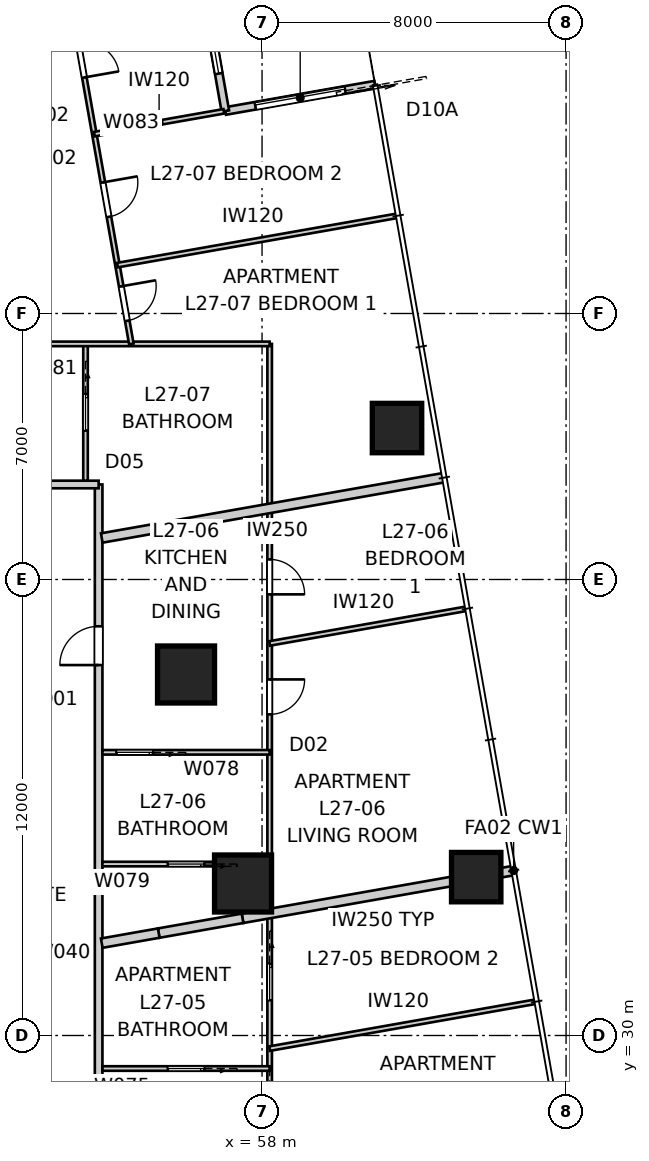
"""IFC4 building model, lengths in metres.
Left out: names, types, materials, properties, quantities, classifications, styles, units other than length and angle.
Written with IfcOpenShell. Run it as: python <this file> out.ifc"""

import sys

from ifc_helpers import new_model, si_unit, direction, frame, frame_2d, origin, origin_2d, place, context, subcontext, project, spatial, rectangle, extrude, element, fill, save


model = new_model("IFC4")
c1 = context("Model", 3, precision=1e-05, world=origin(), true_north=direction((0.0, 1.0)))
c2 = subcontext(c1, "Body", "Model", "MODEL_VIEW")
j1 = project(units=[si_unit("LENGTHUNIT", "METRE"), si_unit("PLANEANGLEUNIT", "RADIAN")], contexts=[c1])
p1 = place(None, origin())
s1 = spatial("IfcSite", under=j1, at=p1, CompositionType="ELEMENT")
p2 = place(p1, origin())
s2 = spatial("IfcBuilding", under=s1, at=p2, CompositionType="ELEMENT")
p3 = place(p2, frame((0.0, 0.0, 99.8)))
s3 = spatial("IfcBuildingStorey", under=s2, at=p3, CompositionType="ELEMENT", Elevation=99.8)
for number, where, z_axis, x_axis in (
    (1, (63.635, 34.167, 0.0), (0.0, 0.0, 1.0), (1.0, 0.0, 0.0)),
    (2, (61.552, 45.985, 0.0), (0.0, 0.0, 1.0), (1.0, 0.0, 0.0)),
):
    element("IfcColumn", number, at=place(p3, frame(where, z_axis=z_axis, x_axis=x_axis)), inside=s3, PredefinedType="COLUMN", context=c2, shape_type="SweptSolid", body=[
        extrude(rectangle(XDim=1.3, YDim=1.3, at=origin_2d()), origin(), (0.0, 0.0, 1.0), 3.4),
    ])
for number, where, z_axis, x_axis in (
    (3, (57.5, 34.0, 0.0), (0.0, 0.0, 1.0), (1.0, 0.0, 0.0)),
    (4, (56.0, 39.5, 0.0), (0.0, 0.0, 1.0), (1.0, 0.0, 0.0)),
):
    element("IfcColumn", number, at=place(p3, frame(where, z_axis=z_axis, x_axis=x_axis)), inside=s3, PredefinedType="COLUMN", context=c2, shape_type="SweptSolid", body=[
        extrude(rectangle(XDim=1.5, YDim=1.5, at=origin_2d()), origin(), (0.0, 0.0, 1.0), 3.4),
    ])
p4 = place(p3, frame((60.974, 55.022, 0.0), z_axis=(0.0, 0.0, 1.0), x_axis=(-0.984808127031, -0.173646056486, 0.0)))
e5 = element("IfcWall", 5, at=p4, inside=s3, PredefinedType="SOLIDWALL", context=c2, shape_type="SweptSolid", body=[
    extrude(rectangle(XDim=4.0, YDim=0.2, at=frame_2d((2.0, 0.0))), origin(), (0.0, 0.0, 1.0), 3.25),
])
p5 = place(p4, frame((0.8, 0.0, 0.0)))
e6 = element("IfcOpeningElement", 6, at=p5, cuts=e5, PredefinedType="OPENING", context=c2, shape_type="SweptSolid", body=[
    extrude(rectangle(XDim=2.4, YDim=2.1, at=frame_2d((1.2, 1.05))), frame((0.0, 0.11, 0.0), z_axis=(0.0, -1.0, 0.0), x_axis=(1.0, 0.0, 0.0)), (0.0, 0.0, 1.0), 0.22),
])
p6 = place(p3, frame((57.034, 54.328, 0.0), z_axis=(0.0, 0.0, 1.0), x_axis=(-0.173646056486, 0.984808127031, 0.0)))
e7 = element("IfcWall", 7, at=p6, inside=s3, PredefinedType="SOLIDWALL", context=c2, shape_type="SweptSolid", body=[
    extrude(rectangle(XDim=4.0, YDim=0.2, at=frame_2d((2.0, 0.0))), origin(), (0.0, 0.0, 1.0), 3.25),
])
p7 = place(p6, frame((1.0, 0.0, 0.45)))
e8 = element("IfcOpeningElement", 8, at=p7, cuts=e7, PredefinedType="OPENING", context=c2, shape_type="SweptSolid", body=[
    extrude(rectangle(XDim=2.0, YDim=1.8, at=frame_2d((1.0, 0.9))), frame((0.0, 0.11, 0.0), z_axis=(0.0, -1.0, 0.0), x_axis=(1.0, 0.0, 0.0)), (0.0, 0.0, 1.0), 0.22),
])
p8 = place(p3, frame((53.7, 15.5, 0.0), z_axis=(0.0, 0.0, 1.0), x_axis=(0.0, 1.0, 0.0)))
e9 = element("IfcWall", 9, at=p8, inside=s3, PredefinedType="PARTITIONING", context=c2, shape_type="SweptSolid", body=[
    extrude(rectangle(XDim=29.0, YDim=0.2, at=frame_2d((14.5, 0.0))), origin(), (0.0, 0.0, 1.0), 3.25),
])
p9 = place(p8, frame((24.248, 0.0, 0.0)))
e10 = element("IfcOpeningElement", 10, at=p9, cuts=e9, PredefinedType="OPENING", context=c2, shape_type="SweptSolid", body=[
    extrude(rectangle(XDim=1.02, YDim=2.34, at=frame_2d((0.51, 1.17))), frame((0.0, 0.11, 0.0), z_axis=(0.0, -1.0, 0.0), x_axis=(1.0, 0.0, 0.0)), (0.0, 0.0, 1.0), 0.22),
])
p10 = place(p8, frame((2.976, 0.0, 0.0)))
e11 = element("IfcOpeningElement", 11, at=p10, cuts=e9, PredefinedType="OPENING", context=c2, shape_type="SweptSolid", body=[
    extrude(rectangle(XDim=1.02, YDim=2.1, at=frame_2d((0.51, 1.05))), frame((0.0, 0.11, 0.0), z_axis=(0.0, -1.0, 0.0), x_axis=(1.0, 0.0, 0.0)), (0.0, 0.0, 1.0), 0.22),
])
p11 = place(p8, frame((8.092, 0.0, 0.0)))
e12 = element("IfcOpeningElement", 12, at=p11, cuts=e9, PredefinedType="OPENING", context=c2, shape_type="SweptSolid", body=[
    extrude(rectangle(XDim=1.02, YDim=2.34, at=frame_2d((0.51, 1.17))), frame((0.0, 0.11, 0.0), z_axis=(0.0, -1.0, 0.0), x_axis=(1.0, 0.0, 0.0)), (0.0, 0.0, 1.0), 0.22),
])
p12 = place(p3, frame((53.7, 44.5, 0.0), z_axis=(0.0, 0.0, 1.0), x_axis=(-1.0, 0.0, 0.0)))
e13 = element("IfcWall", 13, at=p12, inside=s3, PredefinedType="PARTITIONING", context=c2, shape_type="SweptSolid", body=[
    extrude(rectangle(XDim=27.4, YDim=0.2, at=frame_2d((13.7, 0.0))), origin(), (0.0, 0.0, 1.0), 3.25),
])
p13 = place(p12, frame((24.056, 0.0, 0.0)))
e14 = element("IfcOpeningElement", 14, at=p13, cuts=e13, PredefinedType="OPENING", context=c2, shape_type="SweptSolid", body=[
    extrude(rectangle(XDim=1.02, YDim=2.1, at=frame_2d((0.51, 1.05))), frame((0.0, 0.11, 0.0), z_axis=(0.0, -1.0, 0.0), x_axis=(1.0, 0.0, 0.0)), (0.0, 0.0, 1.0), 0.22),
])
p14 = place(p12, frame((2.305, 0.0, 0.0)))
e15 = element("IfcOpeningElement", 15, at=p14, cuts=e13, PredefinedType="OPENING", context=c2, shape_type="SweptSolid", body=[
    extrude(rectangle(XDim=1.02, YDim=2.1, at=frame_2d((0.51, 1.05))), frame((0.0, 0.11, 0.0), z_axis=(0.0, -1.0, 0.0), x_axis=(1.0, 0.0, 0.0)), (0.0, 0.0, 1.0), 0.22),
])
p15 = place(p3, frame((62.797, 44.682, 0.0), z_axis=(0.0, 0.0, 1.0), x_axis=(-0.984810933893, -0.173630137029, 0.0)))
e16 = element("IfcWall", 16, at=p15, inside=s3, PredefinedType="PARTITIONING", context=c2, shape_type="SweptSolid", body=[
    extrude(rectangle(XDim=9.154, YDim=0.25, at=frame_2d((4.577, 0.0))), origin(), (0.0, 0.0, 1.0), 3.25),
])
p16 = place(p3, frame((64.62, 34.341, 0.0), z_axis=(0.0, 0.0, 1.0), x_axis=(-0.984802553948, -0.173677660443, 0.0)))
e17 = element("IfcWall", 17, at=p16, inside=s3, PredefinedType="PARTITIONING", context=c2, shape_type="SweptSolid", body=[
    extrude(rectangle(XDim=7.244, YDim=0.25, at=frame_2d((3.622, 0.0))), origin(), (0.0, 0.0, 1.0), 3.25),
])
p17 = place(p3, frame((57.487, 33.083, 0.0), z_axis=(0.0, 0.0, 1.0), x_axis=(-0.984809882944, -0.17363609779, 0.0)))
e18 = element("IfcWall", 18, at=p17, inside=s3, PredefinedType="PARTITIONING", context=c2, shape_type="SweptSolid", body=[
    extrude(rectangle(XDim=2.24, YDim=0.25, at=frame_2d((1.12, 0.0))), origin(), (0.0, 0.0, 1.0), 2.795),
])
p18 = place(p3, frame((55.281, 32.694, 0.0), z_axis=(0.0, 0.0, 1.0), x_axis=(-0.984815846312, -0.173602272028, 0.0)))
e19 = element("IfcWall", 19, at=p18, inside=s3, PredefinedType="PARTITIONING", context=c2, shape_type="SweptSolid", body=[
    extrude(rectangle(XDim=1.522, YDim=0.25, at=frame_2d((0.761, 0.0))), origin(), (0.0, 0.0, 1.0), 3.25),
])
p19 = place(p3, frame((58.2, 48.2, 0.0), z_axis=(0.0, 0.0, 1.0), x_axis=(0.0, -1.0, 0.0)))
e20 = element("IfcWall", 20, at=p19, inside=s3, PredefinedType="PARTITIONING", context=c2, shape_type="SweptSolid", body=[
    extrude(rectangle(XDim=36.4, YDim=0.12, at=frame_2d((18.2, 0.0))), origin(), (0.0, 0.0, 1.0), 3.25),
])
p20 = place(p19, frame((5.671, 0.0, 0.0)))
e21 = element("IfcOpeningElement", 21, at=p20, cuts=e20, PredefinedType="OPENING", context=c2, shape_type="SweptSolid", body=[
    extrude(rectangle(XDim=0.92, YDim=2.34, at=frame_2d((0.46, 1.17))), frame((0.0, 0.07, 0.0), z_axis=(0.0, -1.0, 0.0), x_axis=(1.0, 0.0, 0.0)), (0.0, 0.0, 1.0), 0.14),
])
p21 = place(p19, frame((8.83, 0.0, 0.0)))
e22 = element("IfcOpeningElement", 22, at=p21, cuts=e20, PredefinedType="OPENING", context=c2, shape_type="SweptSolid", body=[
    extrude(rectangle(XDim=0.92, YDim=2.34, at=frame_2d((0.46, 1.17))), frame((0.0, 0.07, 0.0), z_axis=(0.0, -1.0, 0.0), x_axis=(1.0, 0.0, 0.0)), (0.0, 0.0, 1.0), 0.14),
])
p22 = place(p19, frame((28.35, 0.0, 0.0)))
e23 = element("IfcOpeningElement", 23, at=p22, cuts=e20, PredefinedType="OPENING", context=c2, shape_type="SweptSolid", body=[
    extrude(rectangle(XDim=0.92, YDim=2.34, at=frame_2d((0.46, 1.17))), frame((0.0, 0.07, 0.0), z_axis=(0.0, -1.0, 0.0), x_axis=(1.0, 0.0, 0.0)), (0.0, 0.0, 1.0), 0.14),
])
p23 = place(p19, frame((23.39, 0.0, 0.0)))
e24 = element("IfcOpeningElement", 24, at=p23, cuts=e20, PredefinedType="OPENING", context=c2, shape_type="SweptSolid", body=[
    extrude(rectangle(XDim=0.92, YDim=2.34, at=frame_2d((0.46, 1.17))), frame((0.0, 0.07, 0.0), z_axis=(0.0, -1.0, 0.0), x_axis=(1.0, 0.0, 0.0)), (0.0, 0.0, 1.0), 0.14),
])
p24 = place(p19, frame((19.918, 0.0, 0.0)))
e25 = element("IfcOpeningElement", 25, at=p24, cuts=e20, PredefinedType="OPENING", context=c2, shape_type="SweptSolid", body=[
    extrude(rectangle(XDim=0.96, YDim=2.1, at=frame_2d((0.48, 1.05))), frame((0.0, 0.07, 0.0), z_axis=(0.0, -1.0, 0.0), x_axis=(1.0, 0.0, 0.0)), (0.0, 0.0, 1.0), 0.14),
])
p25 = place(p19, frame((16.313, 0.0, 0.0)))
e26 = element("IfcOpeningElement", 26, at=p25, cuts=e20, PredefinedType="OPENING", context=c2, shape_type="SweptSolid", body=[
    extrude(rectangle(XDim=0.96, YDim=2.1, at=frame_2d((0.48, 1.05))), frame((0.0, 0.07, 0.0), z_axis=(0.0, -1.0, 0.0), x_axis=(1.0, 0.0, 0.0)), (0.0, 0.0, 1.0), 0.14),
])
p26 = place(p3, frame((58.2, 29.131, 0.0), z_axis=(0.0, 0.0, 1.0), x_axis=(-1.0, 0.0, 0.0)))
e27 = element("IfcWall", 27, at=p26, inside=s3, PredefinedType="PARTITIONING", context=c2, shape_type="SweptSolid", body=[
    extrude(rectangle(XDim=4.4, YDim=0.12, at=frame_2d((2.2, 0.0))), origin(), (0.0, 0.0, 1.0), 3.25),
])
p27 = place(p26, frame((1.72, 0.0, 0.0)))
e28 = element("IfcOpeningElement", 28, at=p27, cuts=e27, PredefinedType="OPENING", context=c2, shape_type="SweptSolid", body=[
    extrude(rectangle(XDim=0.96, YDim=2.1, at=frame_2d((0.48, 1.05))), frame((0.0, 0.07, 0.0), z_axis=(0.0, -1.0, 0.0), x_axis=(1.0, 0.0, 0.0)), (0.0, 0.0, 1.0), 0.14),
])
p28 = place(p3, frame((58.2, 29.655, 0.0), z_axis=(0.0, 0.0, 1.0), x_axis=(0.984809869921, 0.17363617165, 0.0)))
e29 = element("IfcWall", 29, at=p28, inside=s3, PredefinedType="PARTITIONING", context=c2, shape_type="SweptSolid", body=[
    extrude(rectangle(XDim=7.096, YDim=0.12, at=frame_2d((3.548, 0.0))), origin(), (0.0, 0.0, 1.0), 3.25),
])
p29 = place(p3, frame((58.2, 37.452, 0.0), z_axis=(0.0, 0.0, 1.0), x_axis=(-1.0, 0.0, 0.0)))
e30 = element("IfcWall", 30, at=p29, inside=s3, PredefinedType="PARTITIONING", context=c2, shape_type="SweptSolid", body=[
    extrude(rectangle(XDim=4.4, YDim=0.12, at=frame_2d((2.2, 0.0))), origin(), (0.0, 0.0, 1.0), 3.25),
])
p30 = place(p29, frame((3.07, 0.0, 0.0)))
e31 = element("IfcOpeningElement", 31, at=p30, cuts=e30, PredefinedType="OPENING", context=c2, shape_type="SweptSolid", body=[
    extrude(rectangle(XDim=0.96, YDim=2.1, at=frame_2d((0.48, 1.05))), frame((0.0, 0.07, 0.0), z_axis=(0.0, -1.0, 0.0), x_axis=(1.0, 0.0, 0.0)), (0.0, 0.0, 1.0), 0.14),
])
p31 = place(p3, frame((58.2, 34.512, 0.0), z_axis=(0.0, 0.0, 1.0), x_axis=(-1.0, 0.0, 0.0)))
e32 = element("IfcWall", 32, at=p31, inside=s3, PredefinedType="PARTITIONING", context=c2, shape_type="SweptSolid", body=[
    extrude(rectangle(XDim=4.4, YDim=0.12, at=frame_2d((2.2, 0.0))), origin(), (0.0, 0.0, 1.0), 3.25),
])
p32 = place(p31, frame((1.72, 0.0, 0.0)))
e33 = element("IfcOpeningElement", 33, at=p32, cuts=e32, PredefinedType="OPENING", context=c2, shape_type="SweptSolid", body=[
    extrude(rectangle(XDim=0.96, YDim=2.1, at=frame_2d((0.48, 1.05))), frame((0.0, 0.07, 0.0), z_axis=(0.0, -1.0, 0.0), x_axis=(1.0, 0.0, 0.0)), (0.0, 0.0, 1.0), 0.14),
])
p33 = place(p3, frame((58.2, 40.317, 0.0), z_axis=(0.0, 0.0, 1.0), x_axis=(0.984812130229, 0.173623351409, 0.0)))
e34 = element("IfcWall", 34, at=p33, inside=s3, PredefinedType="PARTITIONING", context=c2, shape_type="SweptSolid", body=[
    extrude(rectangle(XDim=5.245, YDim=0.12, at=frame_2d((2.623, 0.0))), origin(), (0.0, 0.0, 1.0), 3.25),
])
p34 = place(p3, frame((53.355, 48.2, 0.0), z_axis=(0.0, 0.0, 1.0), x_axis=(0.0, -1.0, 0.0)))
e35 = element("IfcWall", 35, at=p34, inside=s3, PredefinedType="PARTITIONING", context=c2, shape_type="SweptSolid", body=[
    extrude(rectangle(XDim=3.6, YDim=0.12, at=frame_2d((1.8, 0.0))), origin(), (0.0, 0.0, 1.0), 3.25),
])
p35 = place(p34, frame((1.32, 0.0, 0.0)))
e36 = element("IfcOpeningElement", 36, at=p35, cuts=e35, PredefinedType="OPENING", context=c2, shape_type="SweptSolid", body=[
    extrude(rectangle(XDim=0.96, YDim=2.1, at=frame_2d((0.48, 1.05))), frame((0.0, 0.07, 0.0), z_axis=(0.0, -1.0, 0.0), x_axis=(1.0, 0.0, 0.0)), (0.0, 0.0, 1.0), 0.14),
])
p36 = place(p3, frame((21.8, 48.2, 0.0), z_axis=(0.0, 0.0, 1.0), x_axis=(1.0, 0.0, 0.0)))
e37 = element("IfcWall", 37, at=p36, inside=s3, PredefinedType="PARTITIONING", context=c2, shape_type="SweptSolid", body=[
    extrude(rectangle(XDim=36.4, YDim=0.12, at=frame_2d((18.2, 0.0))), origin(), (0.0, 0.0, 1.0), 3.25),
])
p37 = place(p36, frame((7.441, 0.0, 0.0)))
e38 = element("IfcOpeningElement", 38, at=p37, cuts=e37, PredefinedType="OPENING", context=c2, shape_type="SweptSolid", body=[
    extrude(rectangle(XDim=0.92, YDim=2.34, at=frame_2d((0.46, 1.17))), frame((0.0, 0.07, 0.0), z_axis=(0.0, -1.0, 0.0), x_axis=(1.0, 0.0, 0.0)), (0.0, 0.0, 1.0), 0.14),
])
p38 = place(p36, frame((28.144, 0.0, 0.0)))
e39 = element("IfcOpeningElement", 39, at=p38, cuts=e37, PredefinedType="OPENING", context=c2, shape_type="SweptSolid", body=[
    extrude(rectangle(XDim=0.92, YDim=2.34, at=frame_2d((0.46, 1.17))), frame((0.0, 0.07, 0.0), z_axis=(0.0, -1.0, 0.0), x_axis=(1.0, 0.0, 0.0)), (0.0, 0.0, 1.0), 0.14),
])
p39 = place(p36, frame((12.29, 0.0, 0.0)))
e40 = element("IfcOpeningElement", 40, at=p39, cuts=e37, PredefinedType="OPENING", context=c2, shape_type="SweptSolid", body=[
    extrude(rectangle(XDim=0.92, YDim=2.34, at=frame_2d((0.46, 1.17))), frame((0.0, 0.07, 0.0), z_axis=(0.0, -1.0, 0.0), x_axis=(1.0, 0.0, 0.0)), (0.0, 0.0, 1.0), 0.14),
])
p40 = place(p36, frame((15.505, 0.0, 0.0)))
e41 = element("IfcOpeningElement", 41, at=p40, cuts=e37, PredefinedType="OPENING", context=c2, shape_type="SweptSolid", body=[
    extrude(rectangle(XDim=0.96, YDim=2.1, at=frame_2d((0.48, 1.05))), frame((0.0, 0.07, 0.0), z_axis=(0.0, -1.0, 0.0), x_axis=(1.0, 0.0, 0.0)), (0.0, 0.0, 1.0), 0.14),
])
p41 = place(p36, frame((18.991, 0.0, 0.0)))
e42 = element("IfcOpeningElement", 42, at=p41, cuts=e37, PredefinedType="OPENING", context=c2, shape_type="SweptSolid", body=[
    extrude(rectangle(XDim=0.96, YDim=2.1, at=frame_2d((0.48, 1.05))), frame((0.0, 0.07, 0.0), z_axis=(0.0, -1.0, 0.0), x_axis=(1.0, 0.0, 0.0)), (0.0, 0.0, 1.0), 0.14),
])
p42 = place(p3, frame((52.9, 57.62, 0.0), z_axis=(0.0, 0.0, 1.0), x_axis=(0.173642635155, -0.984808730291, 0.0)))
e43 = element("IfcWall", 43, at=p42, inside=s3, PredefinedType="PARTITIONING", context=c2, shape_type="SweptSolid", body=[
    extrude(rectangle(XDim=9.565, YDim=0.12, at=frame_2d((4.782, 0.0))), origin(), (0.0, 0.0, 1.0), 3.25),
])
p43 = place(p42, frame((1.525, 0.0, 0.0)))
e44 = element("IfcOpeningElement", 44, at=p43, cuts=e43, PredefinedType="OPENING", context=c2, shape_type="SweptSolid", body=[
    extrude(rectangle(XDim=0.92, YDim=2.34, at=frame_2d((0.46, 1.17))), frame((0.0, 0.07, 0.0), z_axis=(0.0, -1.0, 0.0), x_axis=(1.0, 0.0, 0.0)), (0.0, 0.0, 1.0), 0.14),
])
p44 = place(p42, frame((5.25, 0.0, 0.0)))
e45 = element("IfcOpeningElement", 45, at=p44, cuts=e43, PredefinedType="OPENING", context=c2, shape_type="SweptSolid", body=[
    extrude(rectangle(XDim=0.92, YDim=2.34, at=frame_2d((0.46, 1.17))), frame((0.0, 0.07, 0.0), z_axis=(0.0, -1.0, 0.0), x_axis=(1.0, 0.0, 0.0)), (0.0, 0.0, 1.0), 0.14),
])
p45 = place(p42, frame((8.028, 0.0, 0.0)))
e46 = element("IfcOpeningElement", 46, at=p45, cuts=e43, PredefinedType="OPENING", context=c2, shape_type="SweptSolid", body=[
    extrude(rectangle(XDim=0.92, YDim=2.34, at=frame_2d((0.46, 1.17))), frame((0.0, 0.07, 0.0), z_axis=(0.0, -1.0, 0.0), x_axis=(1.0, 0.0, 0.0)), (0.0, 0.0, 1.0), 0.14),
])
p46 = place(p3, frame((54.195, 50.273, 0.0), z_axis=(0.0, 0.0, 1.0), x_axis=(0.984807929323, 0.173647177755, 0.0)))
e47 = element("IfcWall", 47, at=p46, inside=s3, PredefinedType="PARTITIONING", context=c2, shape_type="SweptSolid", body=[
    extrude(rectangle(XDim=7.46, YDim=0.12, at=frame_2d((3.73, 0.0))), origin(), (0.0, 0.0, 1.0), 3.25),
])
p47 = place(p3, frame((53.588, 53.72, 0.0), z_axis=(0.0, 0.0, 1.0), x_axis=(0.984805572884, 0.173660541335, 0.0)))
e48 = element("IfcWall", 48, at=p47, inside=s3, PredefinedType="PARTITIONING", context=c2, shape_type="SweptSolid", body=[
    extrude(rectangle(XDim=3.46, YDim=0.12, at=frame_2d((1.73, 0.0))), origin(), (0.0, 0.0, 1.0), 3.25),
])
p48 = place(p5, origin())
e49 = element("IfcDoor", 49, at=p48, inside=s3, OperationType="SLIDING_TO_LEFT", PredefinedType="DOOR", context=c2, shape_type="SweptSolid", body=[
    extrude(rectangle(XDim=2.4, YDim=2.1, at=frame_2d((1.2, 1.05))), frame((0.0, 0.025, 0.0), z_axis=(0.0, -1.0, 0.0), x_axis=(1.0, 0.0, 0.0)), (0.0, 0.0, 1.0), 0.05),
])
fill(e6, e49)
p49 = place(p7, origin())
e50 = element("IfcWindow", 50, at=p49, inside=s3, PartitioningType="SINGLE_PANEL", PredefinedType="WINDOW", context=c2, shape_type="SweptSolid", body=[
    extrude(rectangle(XDim=2.0, YDim=1.8, at=frame_2d((1.0, 0.9))), frame((0.0, 0.03, 0.0), z_axis=(0.0, -1.0, 0.0), x_axis=(1.0, 0.0, 0.0)), (0.0, 0.0, 1.0), 0.06),
])
fill(e8, e50)
p50 = place(p9, origin())
e51 = element("IfcDoor", 51, at=p50, inside=s3, OperationType="SINGLE_SWING_LEFT", PredefinedType="DOOR", context=c2, shape_type="SweptSolid", body=[
    extrude(rectangle(XDim=1.02, YDim=2.34, at=frame_2d((0.51, 1.17))), frame((0.0, 0.025, 0.0), z_axis=(0.0, -1.0, 0.0), x_axis=(1.0, 0.0, 0.0)), (0.0, 0.0, 1.0), 0.05),
])
fill(e10, e51)
p51 = place(p30, origin())
e52 = element("IfcDoor", 52, at=p51, inside=s3, OperationType="SLIDING_TO_LEFT", PredefinedType="DOOR", context=c2, shape_type="SweptSolid", body=[
    extrude(rectangle(XDim=0.96, YDim=2.1, at=frame_2d((0.48, 1.05))), frame((0.0, 0.025, 0.0), z_axis=(0.0, -1.0, 0.0), x_axis=(1.0, 0.0, 0.0)), (0.0, 0.0, 1.0), 0.05),
])
fill(e31, e52)
p52 = place(p20, origin())
e53 = element("IfcDoor", 53, at=p52, inside=s3, OperationType="SINGLE_SWING_RIGHT", PredefinedType="DOOR", context=c2, shape_type="SweptSolid", body=[
    extrude(rectangle(XDim=0.92, YDim=2.34, at=frame_2d((0.46, 1.17))), frame((0.0, 0.025, 0.0), z_axis=(0.0, -1.0, 0.0), x_axis=(1.0, 0.0, 0.0)), (0.0, 0.0, 1.0), 0.05),
])
fill(e21, e53)
p53 = place(p21, origin())
e54 = element("IfcDoor", 54, at=p53, inside=s3, OperationType="SINGLE_SWING_LEFT", PredefinedType="DOOR", context=c2, shape_type="SweptSolid", body=[
    extrude(rectangle(XDim=0.92, YDim=2.34, at=frame_2d((0.46, 1.17))), frame((0.0, 0.025, 0.0), z_axis=(0.0, -1.0, 0.0), x_axis=(1.0, 0.0, 0.0)), (0.0, 0.0, 1.0), 0.05),
])
fill(e22, e54)
p54 = place(p35, origin())
e55 = element("IfcDoor", 55, at=p54, inside=s3, OperationType="SLIDING_TO_LEFT", PredefinedType="DOOR", context=c2, shape_type="SweptSolid", body=[
    extrude(rectangle(XDim=0.96, YDim=2.1, at=frame_2d((0.48, 1.05))), frame((0.0, 0.025, 0.0), z_axis=(0.0, -1.0, 0.0), x_axis=(1.0, 0.0, 0.0)), (0.0, 0.0, 1.0), 0.05),
])
fill(e36, e55)
p55 = place(p32, origin())
e56 = element("IfcDoor", 56, at=p55, inside=s3, OperationType="SLIDING_TO_LEFT", PredefinedType="DOOR", context=c2, shape_type="SweptSolid", body=[
    extrude(rectangle(XDim=0.96, YDim=2.1, at=frame_2d((0.48, 1.05))), frame((0.0, 0.025, 0.0), z_axis=(0.0, -1.0, 0.0), x_axis=(1.0, 0.0, 0.0)), (0.0, 0.0, 1.0), 0.05),
])
fill(e33, e56)
p56 = place(p43, origin())
e57 = element("IfcDoor", 57, at=p56, inside=s3, OperationType="SINGLE_SWING_RIGHT", PredefinedType="DOOR", context=c2, shape_type="SweptSolid", body=[
    extrude(rectangle(XDim=0.92, YDim=2.34, at=frame_2d((0.46, 1.17))), frame((0.0, 0.025, 0.0), z_axis=(0.0, -1.0, 0.0), x_axis=(1.0, 0.0, 0.0)), (0.0, 0.0, 1.0), 0.05),
])
fill(e44, e57)
p57 = place(p44, origin())
e58 = element("IfcDoor", 58, at=p57, inside=s3, OperationType="SINGLE_SWING_LEFT", PredefinedType="DOOR", context=c2, shape_type="SweptSolid", body=[
    extrude(rectangle(XDim=0.92, YDim=2.34, at=frame_2d((0.46, 1.17))), frame((0.0, 0.025, 0.0), z_axis=(0.0, -1.0, 0.0), x_axis=(1.0, 0.0, 0.0)), (0.0, 0.0, 1.0), 0.05),
])
fill(e45, e58)
p58 = place(p45, origin())
e59 = element("IfcDoor", 59, at=p58, inside=s3, OperationType="SINGLE_SWING_LEFT", PredefinedType="DOOR", context=c2, shape_type="SweptSolid", body=[
    extrude(rectangle(XDim=0.92, YDim=2.34, at=frame_2d((0.46, 1.17))), frame((0.0, 0.025, 0.0), z_axis=(0.0, -1.0, 0.0), x_axis=(1.0, 0.0, 0.0)), (0.0, 0.0, 1.0), 0.05),
])
fill(e46, e59)
p59 = place(p27, origin())
e60 = element("IfcDoor", 60, at=p59, inside=s3, OperationType="SLIDING_TO_LEFT", PredefinedType="DOOR", context=c2, shape_type="SweptSolid", body=[
    extrude(rectangle(XDim=0.96, YDim=2.1, at=frame_2d((0.48, 1.05))), frame((0.0, 0.025, 0.0), z_axis=(0.0, -1.0, 0.0), x_axis=(1.0, 0.0, 0.0)), (0.0, 0.0, 1.0), 0.05),
])
fill(e28, e60)
p60 = place(p25, origin())
e61 = element("IfcDoor", 61, at=p60, inside=s3, OperationType="SLIDING_TO_LEFT", PredefinedType="DOOR", context=c2, shape_type="SweptSolid", body=[
    extrude(rectangle(XDim=0.96, YDim=2.1, at=frame_2d((0.48, 1.05))), frame((0.0, 0.025, 0.0), z_axis=(0.0, -1.0, 0.0), x_axis=(1.0, 0.0, 0.0)), (0.0, 0.0, 1.0), 0.05),
])
fill(e26, e61)
save(model, sys.argv[1])
